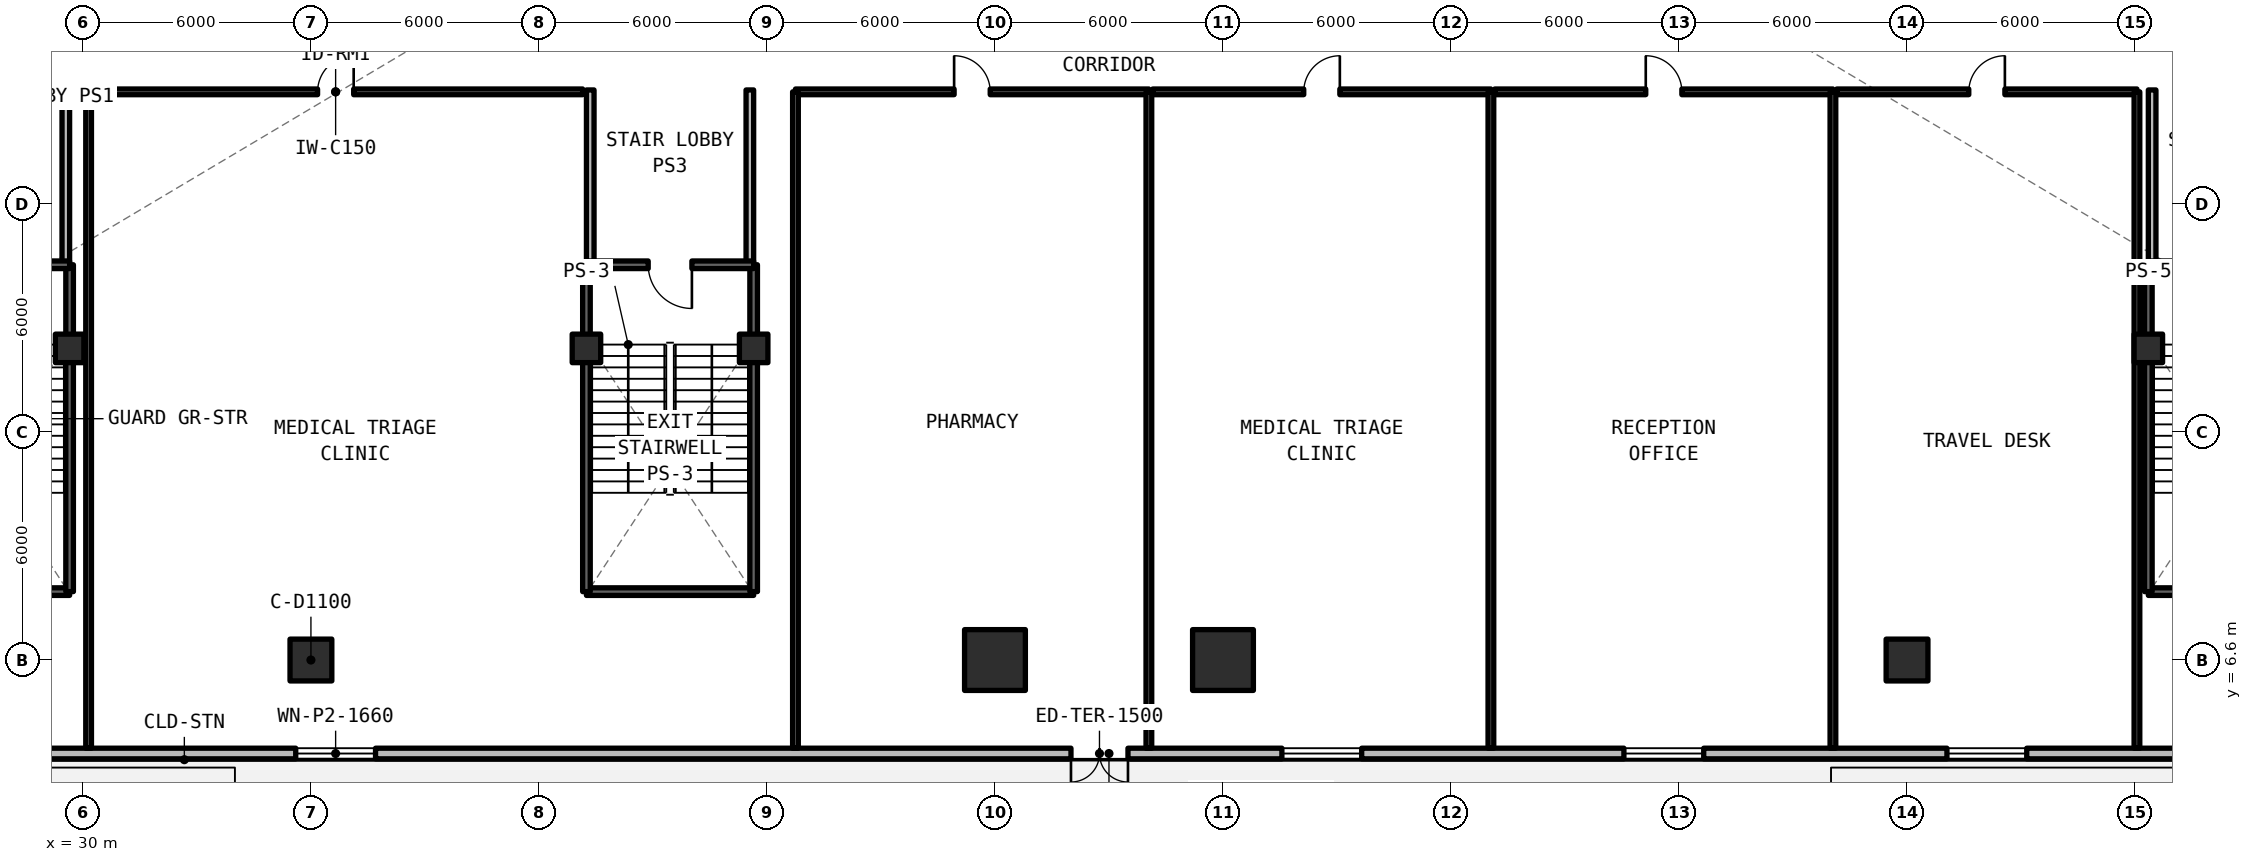
"""IFC4 building model, lengths in metres.
Left out: names, types, materials, properties, quantities, classifications, styles, units other than length and angle.
Written with IfcOpenShell. Run it as: python <this file> out.ifc"""

import sys

from ifc_helpers import new_model, si_unit, direction, frame, frame_2d, origin, origin_2d, place, context, subcontext, project, spatial, rectangle, circle, extrude, element, fill, save


model = new_model("IFC4")
c1 = context("Model", 3, precision=1e-05, world=origin(), true_north=direction((0.0, 1.0)))
c2 = subcontext(c1, "Body", "Model", "MODEL_VIEW")
j1 = project(units=[si_unit("LENGTHUNIT", "METRE"), si_unit("PLANEANGLEUNIT", "RADIAN")], contexts=[c1])
p1 = place(None, origin())
s1 = spatial("IfcSite", under=j1, at=p1, CompositionType="ELEMENT")
p2 = place(p1, origin())
s2 = spatial("IfcBuilding", under=s1, at=p2, CompositionType="ELEMENT")
p3 = place(p2, frame((0.0, 0.0, 19.47)))
s3 = spatial("IfcBuildingStorey", under=s2, at=p3, CompositionType="ELEMENT", Elevation=19.47)
p4 = place(p3, frame((36.0, 6.6, 0.0), z_axis=(0.0, 0.0, 1.0), x_axis=(1.0, 0.0, 0.0)))
e1 = element("IfcColumn", 1, at=p4, inside=s3, PredefinedType="COLUMN", context=c2, shape_type="SweptSolid", body=[
    extrude(circle(Radius=0.55, at=origin_2d()), origin(), (0.0, 0.0, 1.0), 4.62),
])
for number, where, z_axis, x_axis in (
    (2, (54.0, 6.6, 0.0), (0.0, 0.0, 1.0), (1.0, 0.0, 0.0)),
    (3, (60.0, 6.6, 0.0), (0.0, 0.0, 1.0), (1.0, 0.0, 0.0)),
):
    element("IfcColumn", number, at=place(p3, frame(where, z_axis=z_axis, x_axis=x_axis)), inside=s3, PredefinedType="COLUMN", context=c2, shape_type="SweptSolid", body=[
        extrude(rectangle(XDim=1.6, YDim=1.6, at=origin_2d()), origin(), (0.0, 0.0, 1.0), 4.62),
    ])
p5 = place(p3, frame((78.0, 6.6, 0.0), z_axis=(0.0, 0.0, 1.0), x_axis=(1.0, 0.0, 0.0)))
e4 = element("IfcColumn", 4, at=p5, inside=s3, PredefinedType="COLUMN", context=c2, shape_type="SweptSolid", body=[
    extrude(circle(Radius=0.55, at=origin_2d()), origin(), (0.0, 0.0, 1.0), 4.62),
])
for number, where, z_axis, x_axis in (
    (5, (29.65, 14.8, 0.0), (0.0, 0.0, 1.0), (1.0, 0.0, 0.0)),
    (6, (43.25, 14.8, 0.0), (0.0, 0.0, 1.0), (1.0, 0.0, 0.0)),
    (7, (47.65, 14.8, 0.0), (0.0, 0.0, 1.0), (1.0, 0.0, 0.0)),
    (8, (84.35, 14.8, 0.0), (0.0, 0.0, 1.0), (1.0, 0.0, 0.0)),
):
    element("IfcColumn", number, at=place(p3, frame(where, z_axis=z_axis, x_axis=x_axis)), inside=s3, PredefinedType="COLUMN", context=c2, shape_type="SweptSolid", body=[
        extrude(rectangle(XDim=0.75, YDim=0.75, at=origin_2d()), origin(), (0.0, 0.0, 1.0), 4.27),
    ])
p6 = place(p3, frame((9.358, 4.14, 0.0), z_axis=(0.0, 0.0, 1.0), x_axis=(1.0, 0.0, 0.0)))
e9 = element("IfcWall", 9, at=p6, inside=s3, PredefinedType="SOLIDWALL", context=c2, shape_type="SweptSolid", body=[
    extrude(rectangle(XDim=95.284, YDim=0.28, at=frame_2d((47.642, 0.0))), origin(), (0.0, 0.0, 1.0), 4.27),
])
p7 = place(p6, frame((46.642, 0.0, 0.0)))
e10 = element("IfcOpeningElement", 10, at=p7, cuts=e9, PredefinedType="OPENING", context=c2, shape_type="SweptSolid", body=[
    extrude(rectangle(XDim=1.5, YDim=2.2, at=frame_2d((0.75, 1.1))), frame((0.0, 0.15, 0.0), z_axis=(0.0, -1.0, 0.0), x_axis=(1.0, 0.0, 0.0)), (0.0, 0.0, 1.0), 0.3),
])
p8 = place(p6, frame((26.242, 0.0, 0.78)))
e11 = element("IfcOpeningElement", 11, at=p8, cuts=e9, PredefinedType="OPENING", context=c2, shape_type="SweptSolid", body=[
    extrude(rectangle(XDim=2.1, YDim=1.66, at=frame_2d((1.05, 0.83))), frame((0.0, 0.15, 0.0), z_axis=(0.0, -1.0, 0.0), x_axis=(1.0, 0.0, 0.0)), (0.0, 0.0, 1.0), 0.3),
])
p9 = place(p6, frame((52.192, 0.0, 0.78)))
e12 = element("IfcOpeningElement", 12, at=p9, cuts=e9, PredefinedType="OPENING", context=c2, shape_type="SweptSolid", body=[
    extrude(rectangle(XDim=2.1, YDim=1.66, at=frame_2d((1.05, 0.83))), frame((0.0, 0.15, 0.0), z_axis=(0.0, -1.0, 0.0), x_axis=(1.0, 0.0, 0.0)), (0.0, 0.0, 1.0), 0.3),
])
p10 = place(p6, frame((61.192, 0.0, 0.78)))
e13 = element("IfcOpeningElement", 13, at=p10, cuts=e9, PredefinedType="OPENING", context=c2, shape_type="SweptSolid", body=[
    extrude(rectangle(XDim=2.1, YDim=1.66, at=frame_2d((1.05, 0.83))), frame((0.0, 0.15, 0.0), z_axis=(0.0, -1.0, 0.0), x_axis=(1.0, 0.0, 0.0)), (0.0, 0.0, 1.0), 0.3),
])
p11 = place(p6, frame((69.692, 0.0, 0.78)))
e14 = element("IfcOpeningElement", 14, at=p11, cuts=e9, PredefinedType="OPENING", context=c2, shape_type="SweptSolid", body=[
    extrude(rectangle(XDim=2.1, YDim=1.66, at=frame_2d((1.05, 0.83))), frame((0.0, 0.15, 0.0), z_axis=(0.0, -1.0, 0.0), x_axis=(1.0, 0.0, 0.0)), (0.0, 0.0, 1.0), 0.3),
])
p12 = place(p6, frame((6.992, 0.0, 0.78)))
e15 = element("IfcOpeningElement", 15, at=p12, cuts=e9, PredefinedType="OPENING", context=c2, shape_type="SweptSolid", body=[
    extrude(rectangle(XDim=2.1, YDim=1.66, at=frame_2d((1.05, 0.83))), frame((0.0, 0.15, 0.0), z_axis=(0.0, -1.0, 0.0), x_axis=(1.0, 0.0, 0.0)), (0.0, 0.0, 1.0), 0.3),
])
p13 = place(p6, frame((16.967, 0.0, 0.78)))
e16 = element("IfcOpeningElement", 16, at=p13, cuts=e9, PredefinedType="OPENING", context=c2, shape_type="SweptSolid", body=[
    extrude(rectangle(XDim=2.1, YDim=1.66, at=frame_2d((1.05, 0.83))), frame((0.0, 0.15, 0.0), z_axis=(0.0, -1.0, 0.0), x_axis=(1.0, 0.0, 0.0)), (0.0, 0.0, 1.0), 0.3),
])
p14 = place(p6, frame((83.938, 0.0, 0.78)))
e17 = element("IfcOpeningElement", 17, at=p14, cuts=e9, PredefinedType="OPENING", context=c2, shape_type="SweptSolid", body=[
    extrude(rectangle(XDim=2.1, YDim=1.66, at=frame_2d((1.05, 0.83))), frame((0.0, 0.15, 0.0), z_axis=(0.0, -1.0, 0.0), x_axis=(1.0, 0.0, 0.0)), (0.0, 0.0, 1.0), 0.3),
])
for number, where, z_axis, x_axis in (
    (18, (29.55, 17.0, 0.0), (0.0, 0.0, 1.0), (0.0, 1.0, 0.0)),
    (19, (43.35, 17.0, 0.0), (0.0, 0.0, 1.0), (0.0, 1.0, 0.0)),
    (20, (47.55, 17.0, 0.0), (0.0, 0.0, 1.0), (0.0, 1.0, 0.0)),
    (21, (84.45, 17.0, 0.0), (0.0, 0.0, 1.0), (0.0, 1.0, 0.0)),
):
    element("IfcWall", number, at=place(p3, frame(where, z_axis=z_axis, x_axis=x_axis)), inside=s3, PredefinedType="SOLIDWALL", context=c2, shape_type="SweptSolid", body=[
        extrude(rectangle(XDim=4.6, YDim=0.2, at=frame_2d((2.3, 0.0))), origin(), (0.0, 0.0, 1.0), 3.49),
    ])
p15 = place(p3, frame((30.15, 21.55, 0.0), z_axis=(0.0, 0.0, 1.0), x_axis=(1.0, 0.0, 0.0)))
e22 = element("IfcWall", 22, at=p15, inside=s3, PredefinedType="SOLIDWALL", context=c2, shape_type="SweptSolid", body=[
    extrude(rectangle(XDim=13.0, YDim=0.15, at=frame_2d((6.5, 0.0))), origin(), (0.0, 0.0, 1.0), 3.49),
])
p16 = place(p15, frame((6.025, 0.0, 0.0)))
e23 = element("IfcOpeningElement", 23, at=p16, cuts=e22, PredefinedType="OPENING", context=c2, shape_type="SweptSolid", body=[
    extrude(rectangle(XDim=0.95, YDim=2.15, at=frame_2d((0.475, 1.075))), frame((0.0, 0.085, 0.0), z_axis=(0.0, -1.0, 0.0), x_axis=(1.0, 0.0, 0.0)), (0.0, 0.0, 1.0), 0.17),
])
p17 = place(p3, frame((30.15, 4.28, 0.0), z_axis=(0.0, 0.0, 1.0), x_axis=(0.0, 1.0, 0.0)))
e24 = element("IfcWall", 24, at=p17, inside=s3, PredefinedType="SOLIDWALL", context=c2, shape_type="SweptSolid", body=[
    extrude(rectangle(XDim=17.27, YDim=0.15, at=frame_2d((8.635, 0.0))), origin(), (0.0, 0.0, 1.0), 3.49),
])
p18 = place(p3, frame((48.75, 21.55, 0.0), z_axis=(0.0, 0.0, 1.0), x_axis=(1.0, 0.0, 0.0)))
e25 = element("IfcWall", 25, at=p18, inside=s3, PredefinedType="SOLIDWALL", context=c2, shape_type="SweptSolid", body=[
    extrude(rectangle(XDim=9.3, YDim=0.15, at=frame_2d((4.65, 0.0))), origin(), (0.0, 0.0, 1.0), 3.49),
])
p19 = place(p18, frame((4.175, 0.0, 0.0)))
e26 = element("IfcOpeningElement", 26, at=p19, cuts=e25, PredefinedType="OPENING", context=c2, shape_type="SweptSolid", body=[
    extrude(rectangle(XDim=0.95, YDim=2.15, at=frame_2d((0.475, 1.075))), frame((0.0, 0.085, 0.0), z_axis=(0.0, -1.0, 0.0), x_axis=(1.0, 0.0, 0.0)), (0.0, 0.0, 1.0), 0.17),
])
for number, where, z_axis, x_axis in (
    (27, (48.75, 4.28, 0.0), (0.0, 0.0, 1.0), (0.0, 1.0, 0.0)),
    (28, (58.05, 4.28, 0.0), (0.0, 0.0, 1.0), (0.0, 1.0, 0.0)),
):
    element("IfcWall", number, at=place(p3, frame(where, z_axis=z_axis, x_axis=x_axis)), inside=s3, PredefinedType="SOLIDWALL", context=c2, shape_type="SweptSolid", body=[
        extrude(rectangle(XDim=17.27, YDim=0.15, at=frame_2d((8.635, 0.0))), origin(), (0.0, 0.0, 1.0), 3.49),
    ])
p20 = place(p3, frame((58.15, 21.55, 0.0), z_axis=(0.0, 0.0, 1.0), x_axis=(1.0, 0.0, 0.0)))
e29 = element("IfcWall", 29, at=p20, inside=s3, PredefinedType="SOLIDWALL", context=c2, shape_type="SweptSolid", body=[
    extrude(rectangle(XDim=8.9, YDim=0.15, at=frame_2d((4.45, 0.0))), origin(), (0.0, 0.0, 1.0), 3.49),
])
p21 = place(p20, frame((3.975, 0.0, 0.0)))
e30 = element("IfcOpeningElement", 30, at=p21, cuts=e29, PredefinedType="OPENING", context=c2, shape_type="SweptSolid", body=[
    extrude(rectangle(XDim=0.95, YDim=2.15, at=frame_2d((0.475, 1.075))), frame((0.0, 0.085, 0.0), z_axis=(0.0, -1.0, 0.0), x_axis=(1.0, 0.0, 0.0)), (0.0, 0.0, 1.0), 0.17),
])
p22 = place(p3, frame((67.05, 4.28, 0.0), z_axis=(0.0, 0.0, 1.0), x_axis=(0.0, 1.0, 0.0)))
e31 = element("IfcWall", 31, at=p22, inside=s3, PredefinedType="SOLIDWALL", context=c2, shape_type="SweptSolid", body=[
    extrude(rectangle(XDim=17.27, YDim=0.15, at=frame_2d((8.635, 0.0))), origin(), (0.0, 0.0, 1.0), 3.49),
])
p23 = place(p3, frame((67.15, 21.55, 0.0), z_axis=(0.0, 0.0, 1.0), x_axis=(1.0, 0.0, 0.0)))
e32 = element("IfcWall", 32, at=p23, inside=s3, PredefinedType="SOLIDWALL", context=c2, shape_type="SweptSolid", body=[
    extrude(rectangle(XDim=8.9, YDim=0.15, at=frame_2d((4.45, 0.0))), origin(), (0.0, 0.0, 1.0), 3.49),
])
p24 = place(p23, frame((3.975, 0.0, 0.0)))
e33 = element("IfcOpeningElement", 33, at=p24, cuts=e32, PredefinedType="OPENING", context=c2, shape_type="SweptSolid", body=[
    extrude(rectangle(XDim=0.95, YDim=2.15, at=frame_2d((0.475, 1.075))), frame((0.0, 0.085, 0.0), z_axis=(0.0, -1.0, 0.0), x_axis=(1.0, 0.0, 0.0)), (0.0, 0.0, 1.0), 0.17),
])
p25 = place(p3, frame((76.05, 4.28, 0.0), z_axis=(0.0, 0.0, 1.0), x_axis=(0.0, 1.0, 0.0)))
e34 = element("IfcWall", 34, at=p25, inside=s3, PredefinedType="SOLIDWALL", context=c2, shape_type="SweptSolid", body=[
    extrude(rectangle(XDim=17.27, YDim=0.15, at=frame_2d((8.635, 0.0))), origin(), (0.0, 0.0, 1.0), 3.49),
])
p26 = place(p3, frame((76.15, 21.55, 0.0), z_axis=(0.0, 0.0, 1.0), x_axis=(1.0, 0.0, 0.0)))
e35 = element("IfcWall", 35, at=p26, inside=s3, PredefinedType="SOLIDWALL", context=c2, shape_type="SweptSolid", body=[
    extrude(rectangle(XDim=7.9, YDim=0.15, at=frame_2d((3.95, 0.0))), origin(), (0.0, 0.0, 1.0), 3.49),
])
p27 = place(p26, frame((3.475, 0.0, 0.0)))
e36 = element("IfcOpeningElement", 36, at=p27, cuts=e35, PredefinedType="OPENING", context=c2, shape_type="SweptSolid", body=[
    extrude(rectangle(XDim=0.95, YDim=2.15, at=frame_2d((0.475, 1.075))), frame((0.0, 0.085, 0.0), z_axis=(0.0, -1.0, 0.0), x_axis=(1.0, 0.0, 0.0)), (0.0, 0.0, 1.0), 0.17),
])
p28 = place(p3, frame((84.05, 4.28, 0.0), z_axis=(0.0, 0.0, 1.0), x_axis=(0.0, 1.0, 0.0)))
e37 = element("IfcWall", 37, at=p28, inside=s3, PredefinedType="SOLIDWALL", context=c2, shape_type="SweptSolid", body=[
    extrude(rectangle(XDim=17.27, YDim=0.15, at=frame_2d((8.635, 0.0))), origin(), (0.0, 0.0, 1.0), 3.49),
])
p29 = place(p3, frame((25.25, 8.4, 0.0), z_axis=(0.0, 0.0, 1.0), x_axis=(1.0, 0.0, 0.0)))
e38 = element("IfcWall", 38, at=p29, inside=s3, PredefinedType="SOLIDWALL", context=c2, shape_type="SweptSolid", body=[
    extrude(rectangle(XDim=4.4, YDim=0.2, at=frame_2d((2.2, 0.0))), origin(), (0.0, 0.0, 1.0), 4.62),
])
p30 = place(p3, frame((29.65, 8.4, 0.0), z_axis=(0.0, 0.0, 1.0), x_axis=(0.0, 1.0, 0.0)))
e39 = element("IfcWall", 39, at=p30, inside=s3, PredefinedType="SOLIDWALL", context=c2, shape_type="SweptSolid", body=[
    extrude(rectangle(XDim=8.6, YDim=0.2, at=frame_2d((4.3, 0.0))), origin(), (0.0, 0.0, 1.0), 4.62),
])
p31 = place(p3, frame((29.65, 17.0, 0.0), z_axis=(0.0, 0.0, 1.0), x_axis=(-1.0, 0.0, 0.0)))
e40 = element("IfcWall", 40, at=p31, inside=s3, PredefinedType="SOLIDWALL", context=c2, shape_type="SweptSolid", body=[
    extrude(rectangle(XDim=4.4, YDim=0.2, at=frame_2d((2.2, 0.0))), origin(), (0.0, 0.0, 1.0), 4.62),
])
p32 = place(p31, frame((1.625, 0.0, 0.0)))
e41 = element("IfcOpeningElement", 41, at=p32, cuts=e40, PredefinedType="OPENING", context=c2, shape_type="SweptSolid", body=[
    extrude(rectangle(XDim=1.15, YDim=2.15, at=frame_2d((0.575, 1.075))), frame((0.0, 0.11, 0.0), z_axis=(0.0, -1.0, 0.0), x_axis=(1.0, 0.0, 0.0)), (0.0, 0.0, 1.0), 0.22),
])
p33 = place(p3, frame((43.25, 8.4, 0.0), z_axis=(0.0, 0.0, 1.0), x_axis=(1.0, 0.0, 0.0)))
e42 = element("IfcWall", 42, at=p33, inside=s3, PredefinedType="SOLIDWALL", context=c2, shape_type="SweptSolid", body=[
    extrude(rectangle(XDim=4.4, YDim=0.2, at=frame_2d((2.2, 0.0))), origin(), (0.0, 0.0, 1.0), 4.62),
])
p34 = place(p3, frame((47.65, 8.4, 0.0), z_axis=(0.0, 0.0, 1.0), x_axis=(0.0, 1.0, 0.0)))
e43 = element("IfcWall", 43, at=p34, inside=s3, PredefinedType="SOLIDWALL", context=c2, shape_type="SweptSolid", body=[
    extrude(rectangle(XDim=8.6, YDim=0.2, at=frame_2d((4.3, 0.0))), origin(), (0.0, 0.0, 1.0), 4.62),
])
p35 = place(p3, frame((47.65, 17.0, 0.0), z_axis=(0.0, 0.0, 1.0), x_axis=(-1.0, 0.0, 0.0)))
e44 = element("IfcWall", 44, at=p35, inside=s3, PredefinedType="SOLIDWALL", context=c2, shape_type="SweptSolid", body=[
    extrude(rectangle(XDim=4.4, YDim=0.2, at=frame_2d((2.2, 0.0))), origin(), (0.0, 0.0, 1.0), 4.62),
])
p36 = place(p35, frame((1.625, 0.0, 0.0)))
e45 = element("IfcOpeningElement", 45, at=p36, cuts=e44, PredefinedType="OPENING", context=c2, shape_type="SweptSolid", body=[
    extrude(rectangle(XDim=1.15, YDim=2.15, at=frame_2d((0.575, 1.075))), frame((0.0, 0.11, 0.0), z_axis=(0.0, -1.0, 0.0), x_axis=(1.0, 0.0, 0.0)), (0.0, 0.0, 1.0), 0.22),
])
p37 = place(p3, frame((43.25, 17.0, 0.0), z_axis=(0.0, 0.0, 1.0), x_axis=(0.0, -1.0, 0.0)))
e46 = element("IfcWall", 46, at=p37, inside=s3, PredefinedType="SOLIDWALL", context=c2, shape_type="SweptSolid", body=[
    extrude(rectangle(XDim=8.6, YDim=0.2, at=frame_2d((4.3, 0.0))), origin(), (0.0, 0.0, 1.0), 4.62),
])
p38 = place(p3, frame((84.35, 8.4, 0.0), z_axis=(0.0, 0.0, 1.0), x_axis=(1.0, 0.0, 0.0)))
e47 = element("IfcWall", 47, at=p38, inside=s3, PredefinedType="SOLIDWALL", context=c2, shape_type="SweptSolid", body=[
    extrude(rectangle(XDim=4.4, YDim=0.2, at=frame_2d((2.2, 0.0))), origin(), (0.0, 0.0, 1.0), 4.62),
])
p39 = place(p3, frame((88.75, 17.0, 0.0), z_axis=(0.0, 0.0, 1.0), x_axis=(-1.0, 0.0, 0.0)))
e48 = element("IfcWall", 48, at=p39, inside=s3, PredefinedType="SOLIDWALL", context=c2, shape_type="SweptSolid", body=[
    extrude(rectangle(XDim=4.4, YDim=0.2, at=frame_2d((2.2, 0.0))), origin(), (0.0, 0.0, 1.0), 4.62),
])
p40 = place(p39, frame((1.625, 0.0, 0.0)))
e49 = element("IfcOpeningElement", 49, at=p40, cuts=e48, PredefinedType="OPENING", context=c2, shape_type="SweptSolid", body=[
    extrude(rectangle(XDim=1.15, YDim=2.15, at=frame_2d((0.575, 1.075))), frame((0.0, 0.11, 0.0), z_axis=(0.0, -1.0, 0.0), x_axis=(1.0, 0.0, 0.0)), (0.0, 0.0, 1.0), 0.22),
])
p41 = place(p3, frame((84.35, 17.0, 0.0), z_axis=(0.0, 0.0, 1.0), x_axis=(0.0, -1.0, 0.0)))
e50 = element("IfcWall", 50, at=p41, inside=s3, PredefinedType="SOLIDWALL", context=c2, shape_type="SweptSolid", body=[
    extrude(rectangle(XDim=8.6, YDim=0.2, at=frame_2d((4.3, 0.0))), origin(), (0.0, 0.0, 1.0), 4.62),
])
p42 = place(p7, frame((1.5, 0.0, 0.0), z_axis=(0.0, 0.0, 1.0), x_axis=(-1.0, 0.0, 0.0)))
e51 = element("IfcDoor", 51, at=p42, inside=s3, OperationType="SINGLE_SWING_RIGHT", PredefinedType="DOOR", context=c2, shape_type="SweptSolid", body=[
    extrude(rectangle(XDim=1.5, YDim=2.2, at=frame_2d((0.75, 1.1))), frame((0.0, 0.025, 0.0), z_axis=(0.0, -1.0, 0.0), x_axis=(1.0, 0.0, 0.0)), (0.0, 0.0, 1.0), 0.05),
])
fill(e10, e51)
p43 = place(p8, origin())
e52 = element("IfcWindow", 52, at=p43, inside=s3, PartitioningType="SINGLE_PANEL", PredefinedType="WINDOW", context=c2, shape_type="SweptSolid", body=[
    extrude(rectangle(XDim=2.1, YDim=1.66, at=frame_2d((1.05, 0.83))), frame((0.0, 0.03, 0.0), z_axis=(0.0, -1.0, 0.0), x_axis=(1.0, 0.0, 0.0)), (0.0, 0.0, 1.0), 0.06),
])
fill(e11, e52)
p44 = place(p9, origin())
e53 = element("IfcWindow", 53, at=p44, inside=s3, PartitioningType="SINGLE_PANEL", PredefinedType="WINDOW", context=c2, shape_type="SweptSolid", body=[
    extrude(rectangle(XDim=2.1, YDim=1.66, at=frame_2d((1.05, 0.83))), frame((0.0, 0.03, 0.0), z_axis=(0.0, -1.0, 0.0), x_axis=(1.0, 0.0, 0.0)), (0.0, 0.0, 1.0), 0.06),
])
fill(e12, e53)
p45 = place(p10, origin())
e54 = element("IfcWindow", 54, at=p45, inside=s3, PartitioningType="SINGLE_PANEL", PredefinedType="WINDOW", context=c2, shape_type="SweptSolid", body=[
    extrude(rectangle(XDim=2.1, YDim=1.66, at=frame_2d((1.05, 0.83))), frame((0.0, 0.03, 0.0), z_axis=(0.0, -1.0, 0.0), x_axis=(1.0, 0.0, 0.0)), (0.0, 0.0, 1.0), 0.06),
])
fill(e13, e54)
p46 = place(p11, origin())
e55 = element("IfcWindow", 55, at=p46, inside=s3, PartitioningType="SINGLE_PANEL", PredefinedType="WINDOW", context=c2, shape_type="SweptSolid", body=[
    extrude(rectangle(XDim=2.1, YDim=1.66, at=frame_2d((1.05, 0.83))), frame((0.0, 0.03, 0.0), z_axis=(0.0, -1.0, 0.0), x_axis=(1.0, 0.0, 0.0)), (0.0, 0.0, 1.0), 0.06),
])
fill(e14, e55)
p47 = place(p16, origin())
e56 = element("IfcDoor", 56, at=p47, inside=s3, OperationType="SINGLE_SWING_RIGHT", PredefinedType="DOOR", context=c2, shape_type="SweptSolid", body=[
    extrude(rectangle(XDim=0.95, YDim=2.15, at=frame_2d((0.475, 1.075))), frame((0.0, 0.025, 0.0), z_axis=(0.0, -1.0, 0.0), x_axis=(1.0, 0.0, 0.0)), (0.0, 0.0, 1.0), 0.05),
])
fill(e23, e56)
p48 = place(p19, origin())
e57 = element("IfcDoor", 57, at=p48, inside=s3, OperationType="SINGLE_SWING_LEFT", PredefinedType="DOOR", context=c2, shape_type="SweptSolid", body=[
    extrude(rectangle(XDim=0.95, YDim=2.15, at=frame_2d((0.475, 1.075))), frame((0.0, 0.025, 0.0), z_axis=(0.0, -1.0, 0.0), x_axis=(1.0, 0.0, 0.0)), (0.0, 0.0, 1.0), 0.05),
])
fill(e26, e57)
p49 = place(p21, origin())
e58 = element("IfcDoor", 58, at=p49, inside=s3, OperationType="SINGLE_SWING_RIGHT", PredefinedType="DOOR", context=c2, shape_type="SweptSolid", body=[
    extrude(rectangle(XDim=0.95, YDim=2.15, at=frame_2d((0.475, 1.075))), frame((0.0, 0.025, 0.0), z_axis=(0.0, -1.0, 0.0), x_axis=(1.0, 0.0, 0.0)), (0.0, 0.0, 1.0), 0.05),
])
fill(e30, e58)
p50 = place(p24, origin())
e59 = element("IfcDoor", 59, at=p50, inside=s3, OperationType="SINGLE_SWING_LEFT", PredefinedType="DOOR", context=c2, shape_type="SweptSolid", body=[
    extrude(rectangle(XDim=0.95, YDim=2.15, at=frame_2d((0.475, 1.075))), frame((0.0, 0.025, 0.0), z_axis=(0.0, -1.0, 0.0), x_axis=(1.0, 0.0, 0.0)), (0.0, 0.0, 1.0), 0.05),
])
fill(e33, e59)
p51 = place(p27, origin())
e60 = element("IfcDoor", 60, at=p51, inside=s3, OperationType="SINGLE_SWING_RIGHT", PredefinedType="DOOR", context=c2, shape_type="SweptSolid", body=[
    extrude(rectangle(XDim=0.95, YDim=2.15, at=frame_2d((0.475, 1.075))), frame((0.0, 0.025, 0.0), z_axis=(0.0, -1.0, 0.0), x_axis=(1.0, 0.0, 0.0)), (0.0, 0.0, 1.0), 0.05),
])
fill(e36, e60)
p52 = place(p36, origin())
e61 = element("IfcDoor", 61, at=p52, inside=s3, OperationType="SINGLE_SWING_RIGHT", PredefinedType="DOOR", context=c2, shape_type="SweptSolid", body=[
    extrude(rectangle(XDim=1.15, YDim=2.15, at=frame_2d((0.575, 1.075))), frame((0.0, 0.025, 0.0), z_axis=(0.0, -1.0, 0.0), x_axis=(1.0, 0.0, 0.0)), (0.0, 0.0, 1.0), 0.05),
])
fill(e45, e61)
save(model, sys.argv[1])
